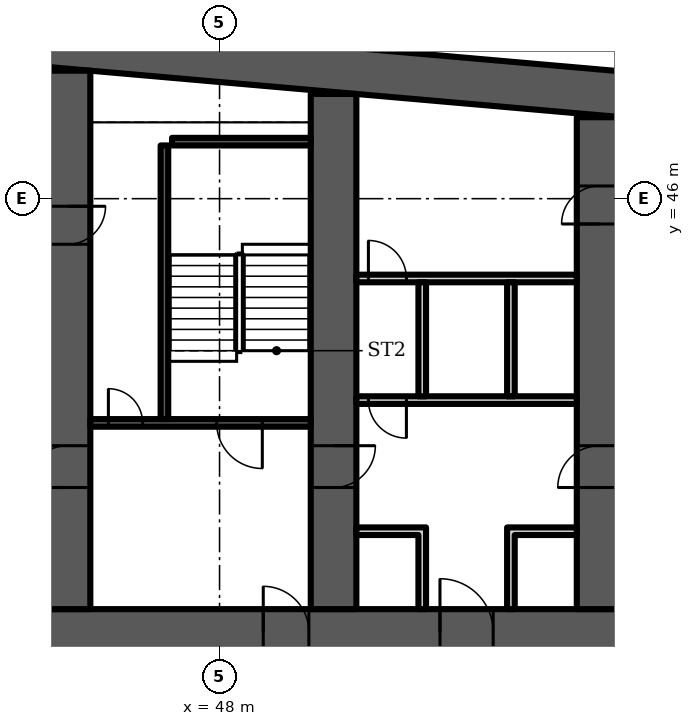
"""IFC4 building model, lengths in metres.
Left out: names, types, materials, properties, quantities, classifications, styles, units other than length and angle.
Written with IfcOpenShell. Run it as: python <this file> out.ifc"""

import sys

from ifc_helpers import new_model, si_unit, direction, frame, frame_2d, origin, place, context, subcontext, project, spatial, polyline, rectangle, outline, extrude, element, fill, save


model = new_model("IFC4")
c1 = context("Model", 3, precision=1e-05, world=origin(), true_north=direction((0.0, 1.0)))
c2 = subcontext(c1, "Body", "Model", "MODEL_VIEW")
j1 = project(units=[si_unit("LENGTHUNIT", "METRE"), si_unit("PLANEANGLEUNIT", "RADIAN")], contexts=[c1])
p1 = place(None, origin())
s1 = spatial("IfcSite", under=j1, at=p1, CompositionType="ELEMENT")
p2 = place(p1, origin())
s2 = spatial("IfcBuilding", under=s1, at=p2, CompositionType="ELEMENT")
p3 = place(p2, frame((0.0, 0.0, 52.3)))
s3 = spatial("IfcBuildingStorey", under=s2, at=p3, CompositionType="ELEMENT", Elevation=52.3)
p4 = place(p3, frame((0.0, 0.0, -0.0)))
e1 = element("IfcWall", 1, at=p4, inside=s3, PredefinedType="SHEAR", context=c2, shape_type="SweptSolid", body=[
    extrude(outline(polyline([(9.0, 47.583), (37.0, 50.032), (65.0, 47.583), (65.0, 48.787), (37.0, 51.237), (9.0, 48.787), (9.0, 47.583)])), origin(), (0.0, 0.0, 1.0), 3.6),
])
p5 = place(p3, frame((9.0, 34.6, 0.0), z_axis=(0.0, 0.0, 1.0), x_axis=(1.0, 0.0, 0.0)))
e2 = element("IfcWall", 2, at=p5, inside=s3, PredefinedType="SHEAR", context=c2, shape_type="SweptSolid", body=[
    extrude(rectangle(XDim=56.0, YDim=1.2, at=frame_2d((28.0, 0.0))), origin(), (0.0, 0.0, 1.0), 3.6),
])
p6 = place(p5, frame((2.0, 0.0, 0.0)))
e3 = element("IfcOpeningElement", 3, at=p6, cuts=e2, PredefinedType="OPENING", context=c2, shape_type="SweptSolid", body=[
    extrude(rectangle(XDim=1.0, YDim=2.1, at=frame_2d((0.5, 1.05))), frame((0.0, 0.61, 0.0), z_axis=(0.0, -1.0, 0.0), x_axis=(1.0, 0.0, 0.0)), (0.0, 0.0, 1.0), 1.22),
])
p7 = place(p5, frame((4.6, 0.0, 0.0)))
e4 = element("IfcOpeningElement", 4, at=p7, cuts=e2, PredefinedType="OPENING", context=c2, shape_type="SweptSolid", body=[
    extrude(rectangle(XDim=1.0, YDim=2.1, at=frame_2d((0.5, 1.05))), frame((0.0, 0.61, 0.0), z_axis=(0.0, -1.0, 0.0), x_axis=(1.0, 0.0, 0.0)), (0.0, 0.0, 1.0), 1.22),
])
p8 = place(p5, frame((7.867, 0.0, 0.0)))
e5 = element("IfcOpeningElement", 5, at=p8, cuts=e2, PredefinedType="OPENING", context=c2, shape_type="SweptSolid", body=[
    extrude(rectangle(XDim=1.1, YDim=2.1, at=frame_2d((0.55, 1.05))), frame((0.0, 0.61, 0.0), z_axis=(0.0, -1.0, 0.0), x_axis=(1.0, 0.0, 0.0)), (0.0, 0.0, 1.0), 1.22),
])
p9 = place(p5, frame((12.033, 0.0, 0.0)))
e6 = element("IfcOpeningElement", 6, at=p9, cuts=e2, PredefinedType="OPENING", context=c2, shape_type="SweptSolid", body=[
    extrude(rectangle(XDim=1.1, YDim=2.1, at=frame_2d((0.55, 1.05))), frame((0.0, 0.61, 0.0), z_axis=(0.0, -1.0, 0.0), x_axis=(1.0, 0.0, 0.0)), (0.0, 0.0, 1.0), 1.22),
])
p10 = place(p5, frame((9.8, 0.0, 0.0)))
e7 = element("IfcOpeningElement", 7, at=p10, cuts=e2, PredefinedType="OPENING", context=c2, shape_type="SweptSolid", body=[
    extrude(rectangle(XDim=1.4, YDim=2.1, at=frame_2d((0.7, 1.05))), frame((0.0, 0.61, 0.0), z_axis=(0.0, -1.0, 0.0), x_axis=(1.0, 0.0, 0.0)), (0.0, 0.0, 1.0), 1.22),
])
p11 = place(p5, frame((14.65, 0.0, 0.0)))
e8 = element("IfcOpeningElement", 8, at=p11, cuts=e2, PredefinedType="OPENING", context=c2, shape_type="SweptSolid", body=[
    extrude(rectangle(XDim=1.2, YDim=2.1, at=frame_2d((0.6, 1.05))), frame((0.0, 0.61, 0.0), z_axis=(0.0, -1.0, 0.0), x_axis=(1.0, 0.0, 0.0)), (0.0, 0.0, 1.0), 1.22),
])
p12 = place(p5, frame((21.867, 0.0, 0.0)))
e9 = element("IfcOpeningElement", 9, at=p12, cuts=e2, PredefinedType="OPENING", context=c2, shape_type="SweptSolid", body=[
    extrude(rectangle(XDim=1.1, YDim=2.1, at=frame_2d((0.55, 1.05))), frame((0.0, 0.61, 0.0), z_axis=(0.0, -1.0, 0.0), x_axis=(1.0, 0.0, 0.0)), (0.0, 0.0, 1.0), 1.22),
])
p13 = place(p5, frame((26.033, 0.0, 0.0)))
e10 = element("IfcOpeningElement", 10, at=p13, cuts=e2, PredefinedType="OPENING", context=c2, shape_type="SweptSolid", body=[
    extrude(rectangle(XDim=1.1, YDim=2.1, at=frame_2d((0.55, 1.05))), frame((0.0, 0.61, 0.0), z_axis=(0.0, -1.0, 0.0), x_axis=(1.0, 0.0, 0.0)), (0.0, 0.0, 1.0), 1.22),
])
p14 = place(p5, frame((23.8, 0.0, 0.0)))
e11 = element("IfcOpeningElement", 11, at=p14, cuts=e2, PredefinedType="OPENING", context=c2, shape_type="SweptSolid", body=[
    extrude(rectangle(XDim=1.4, YDim=2.1, at=frame_2d((0.7, 1.05))), frame((0.0, 0.61, 0.0), z_axis=(0.0, -1.0, 0.0), x_axis=(1.0, 0.0, 0.0)), (0.0, 0.0, 1.0), 1.22),
])
p15 = place(p5, frame((28.867, 0.0, 0.0)))
e12 = element("IfcOpeningElement", 12, at=p15, cuts=e2, PredefinedType="OPENING", context=c2, shape_type="SweptSolid", body=[
    extrude(rectangle(XDim=1.1, YDim=2.1, at=frame_2d((0.55, 1.05))), frame((0.0, 0.61, 0.0), z_axis=(0.0, -1.0, 0.0), x_axis=(1.0, 0.0, 0.0)), (0.0, 0.0, 1.0), 1.22),
])
p16 = place(p5, frame((33.033, 0.0, 0.0)))
e13 = element("IfcOpeningElement", 13, at=p16, cuts=e2, PredefinedType="OPENING", context=c2, shape_type="SweptSolid", body=[
    extrude(rectangle(XDim=1.1, YDim=2.1, at=frame_2d((0.55, 1.05))), frame((0.0, 0.61, 0.0), z_axis=(0.0, -1.0, 0.0), x_axis=(1.0, 0.0, 0.0)), (0.0, 0.0, 1.0), 1.22),
])
p17 = place(p5, frame((40.15, 0.0, 0.0)))
e14 = element("IfcOpeningElement", 14, at=p17, cuts=e2, PredefinedType="OPENING", context=c2, shape_type="SweptSolid", body=[
    extrude(rectangle(XDim=1.2, YDim=2.1, at=frame_2d((0.6, 1.05))), frame((0.0, 0.61, 0.0), z_axis=(0.0, -1.0, 0.0), x_axis=(1.0, 0.0, 0.0)), (0.0, 0.0, 1.0), 1.22),
])
p18 = place(p5, frame((44.8, 0.0, 0.0)))
e15 = element("IfcOpeningElement", 15, at=p18, cuts=e2, PredefinedType="OPENING", context=c2, shape_type="SweptSolid", body=[
    extrude(rectangle(XDim=1.4, YDim=2.1, at=frame_2d((0.7, 1.05))), frame((0.0, 0.61, 0.0), z_axis=(0.0, -1.0, 0.0), x_axis=(1.0, 0.0, 0.0)), (0.0, 0.0, 1.0), 1.22),
])
p19 = place(p5, frame((49.867, 0.0, 0.0)))
e16 = element("IfcOpeningElement", 16, at=p19, cuts=e2, PredefinedType="OPENING", context=c2, shape_type="SweptSolid", body=[
    extrude(rectangle(XDim=1.1, YDim=2.1, at=frame_2d((0.55, 1.05))), frame((0.0, 0.61, 0.0), z_axis=(0.0, -1.0, 0.0), x_axis=(1.0, 0.0, 0.0)), (0.0, 0.0, 1.0), 1.22),
])
p20 = place(p5, frame((53.5, 0.0, 0.0)))
e17 = element("IfcOpeningElement", 17, at=p20, cuts=e2, PredefinedType="OPENING", context=c2, shape_type="SweptSolid", body=[
    extrude(rectangle(XDim=1.1, YDim=2.1, at=frame_2d((0.55, 1.05))), frame((0.0, 0.61, 0.0), z_axis=(0.0, -1.0, 0.0), x_axis=(1.0, 0.0, 0.0)), (0.0, 0.0, 1.0), 1.22),
])
p21 = place(p5, frame((51.567, 0.0, 0.0)))
e18 = element("IfcOpeningElement", 18, at=p21, cuts=e2, PredefinedType="OPENING", context=c2, shape_type="SweptSolid", body=[
    extrude(rectangle(XDim=1.4, YDim=2.1, at=frame_2d((0.7, 1.05))), frame((0.0, 0.61, 0.0), z_axis=(0.0, -1.0, 0.0), x_axis=(1.0, 0.0, 0.0)), (0.0, 0.0, 1.0), 1.22),
])
p22 = place(p3, frame((44.0, 35.2, 0.0), z_axis=(0.0, 0.0, 1.0), x_axis=(0.0, 1.0, 0.0)))
e19 = element("IfcWall", 19, at=p22, inside=s3, PredefinedType="SHEAR", context=c2, shape_type="SweptSolid", body=[
    extrude(rectangle(XDim=14.168, YDim=1.2, at=frame_2d((7.084, 0.0))), origin(), (0.0, 0.0, 1.0), 3.6),
])
p23 = place(p22, frame((3.2, 0.0, 0.0)))
e20 = element("IfcOpeningElement", 20, at=p23, cuts=e19, PredefinedType="OPENING", context=c2, shape_type="SweptSolid", body=[
    extrude(rectangle(XDim=1.1, YDim=2.1, at=frame_2d((0.55, 1.05))), frame((0.0, 0.61, 0.0), z_axis=(0.0, -1.0, 0.0), x_axis=(1.0, 0.0, 0.0)), (0.0, 0.0, 1.0), 1.22),
])
p24 = place(p22, frame((9.6, 0.0, 0.0)))
e21 = element("IfcOpeningElement", 21, at=p24, cuts=e19, PredefinedType="OPENING", context=c2, shape_type="SweptSolid", body=[
    extrude(rectangle(XDim=1.0, YDim=2.1, at=frame_2d((0.5, 1.05))), frame((0.0, 0.61, 0.0), z_axis=(0.0, -1.0, 0.0), x_axis=(1.0, 0.0, 0.0)), (0.0, 0.0, 1.0), 1.22),
])
p25 = place(p3, frame((51.0, 35.2, 0.0), z_axis=(0.0, 0.0, 1.0), x_axis=(0.0, 1.0, 0.0)))
e22 = element("IfcWall", 22, at=p25, inside=s3, PredefinedType="SHEAR", context=c2, shape_type="SweptSolid", body=[
    extrude(rectangle(XDim=13.555, YDim=1.2, at=frame_2d((6.778, 0.0))), origin(), (0.0, 0.0, 1.0), 3.6),
])
p26 = place(p25, frame((3.2, 0.0, 0.0)))
e23 = element("IfcOpeningElement", 23, at=p26, cuts=e22, PredefinedType="OPENING", context=c2, shape_type="SweptSolid", body=[
    extrude(rectangle(XDim=1.1, YDim=2.1, at=frame_2d((0.55, 1.05))), frame((0.0, 0.61, 0.0), z_axis=(0.0, -1.0, 0.0), x_axis=(1.0, 0.0, 0.0)), (0.0, 0.0, 1.0), 1.22),
])
p27 = place(p3, frame((58.0, 35.2, 0.0), z_axis=(0.0, 0.0, 1.0), x_axis=(0.0, 1.0, 0.0)))
e24 = element("IfcWall", 24, at=p27, inside=s3, PredefinedType="SHEAR", context=c2, shape_type="SweptSolid", body=[
    extrude(rectangle(XDim=12.943, YDim=1.2, at=frame_2d((6.471, 0.0))), origin(), (0.0, 0.0, 1.0), 3.6),
])
p28 = place(p27, frame((10.134, 0.0, 0.0)))
e25 = element("IfcOpeningElement", 25, at=p28, cuts=e24, PredefinedType="OPENING", context=c2, shape_type="SweptSolid", body=[
    extrude(rectangle(XDim=1.0, YDim=2.1, at=frame_2d((0.5, 1.05))), frame((0.0, 0.61, 0.0), z_axis=(0.0, -1.0, 0.0), x_axis=(1.0, 0.0, 0.0)), (0.0, 0.0, 1.0), 1.22),
])
p29 = place(p27, frame((3.2, 0.0, 0.0)))
e26 = element("IfcOpeningElement", 26, at=p29, cuts=e24, PredefinedType="OPENING", context=c2, shape_type="SweptSolid", body=[
    extrude(rectangle(XDim=1.1, YDim=2.1, at=frame_2d((0.55, 1.05))), frame((0.0, 0.61, 0.0), z_axis=(0.0, -1.0, 0.0), x_axis=(1.0, 0.0, 0.0)), (0.0, 0.0, 1.0), 1.22),
])
p30 = place(p3, frame((44.6, 40.1, 0.0), z_axis=(0.0, 0.0, 1.0), x_axis=(1.0, 0.0, 0.0)))
e27 = element("IfcWall", 27, at=p30, inside=s3, PredefinedType="SHEAR", context=c2, shape_type="SweptSolid", body=[
    extrude(rectangle(XDim=5.8, YDim=0.2, at=frame_2d((2.9, 0.0))), origin(), (0.0, 0.0, 1.0), 3.2),
])
p31 = place(p30, frame((3.325, 0.0, 0.0)))
e28 = element("IfcOpeningElement", 28, at=p31, cuts=e27, PredefinedType="OPENING", context=c2, shape_type="SweptSolid", body=[
    extrude(rectangle(XDim=1.2, YDim=2.1, at=frame_2d((0.6, 1.05))), frame((0.0, 0.11, 0.0), z_axis=(0.0, -1.0, 0.0), x_axis=(1.0, 0.0, 0.0)), (0.0, 0.0, 1.0), 0.22),
])
p32 = place(p30, frame((0.475, 0.0, 0.0)))
e29 = element("IfcOpeningElement", 29, at=p32, cuts=e27, PredefinedType="OPENING", context=c2, shape_type="SweptSolid", body=[
    extrude(rectangle(XDim=0.9, YDim=2.1, at=frame_2d((0.45, 1.05))), frame((0.0, 0.11, 0.0), z_axis=(0.0, -1.0, 0.0), x_axis=(1.0, 0.0, 0.0)), (0.0, 0.0, 1.0), 0.22),
])
p33 = place(p3, frame((46.55, 40.2, 0.0), z_axis=(0.0, 0.0, 1.0), x_axis=(0.0, 1.0, 0.0)))
e30 = element("IfcWall", 30, at=p33, inside=s3, PredefinedType="SHEAR", context=c2, shape_type="SweptSolid", body=[
    extrude(rectangle(XDim=7.2, YDim=0.2, at=frame_2d((3.6, 0.0))), origin(), (0.0, 0.0, 1.0), 3.2),
])
p34 = place(p3, frame((46.75, 47.5, 0.0), z_axis=(0.0, 0.0, 1.0), x_axis=(1.0, 0.0, 0.0)))
e31 = element("IfcWall", 31, at=p34, inside=s3, PredefinedType="SHEAR", context=c2, shape_type="SweptSolid", body=[
    extrude(rectangle(XDim=3.65, YDim=0.2, at=frame_2d((1.825, 0.0))), origin(), (0.0, 0.0, 1.0), 3.2),
])
p35 = place(p3, frame((51.6, 40.7, 0.0), z_axis=(0.0, 0.0, 1.0), x_axis=(1.0, 0.0, 0.0)))
e32 = element("IfcWall", 32, at=p35, inside=s3, PredefinedType="PARTITIONING", context=c2, shape_type="SweptSolid", body=[
    extrude(rectangle(XDim=5.8, YDim=0.2, at=frame_2d((2.9, 0.0))), origin(), (0.0, 0.0, 1.0), 3.2),
])
p36 = place(p35, frame((0.317, 0.0, 0.0)))
e33 = element("IfcOpeningElement", 33, at=p36, cuts=e32, PredefinedType="OPENING", context=c2, shape_type="SweptSolid", body=[
    extrude(rectangle(XDim=1.0, YDim=2.1, at=frame_2d((0.5, 1.05))), frame((0.0, 0.11, 0.0), z_axis=(0.0, -1.0, 0.0), x_axis=(1.0, 0.0, 0.0)), (0.0, 0.0, 1.0), 0.22),
])
p37 = place(p3, frame((51.6, 43.9, 0.0), z_axis=(0.0, 0.0, 1.0), x_axis=(1.0, 0.0, 0.0)))
e34 = element("IfcWall", 34, at=p37, inside=s3, PredefinedType="PARTITIONING", context=c2, shape_type="SweptSolid", body=[
    extrude(rectangle(XDim=5.8, YDim=0.2, at=frame_2d((2.9, 0.0))), origin(), (0.0, 0.0, 1.0), 3.2),
])
p38 = place(p37, frame((0.317, 0.0, 0.0)))
e35 = element("IfcOpeningElement", 35, at=p38, cuts=e34, PredefinedType="OPENING", context=c2, shape_type="SweptSolid", body=[
    extrude(rectangle(XDim=1.0, YDim=2.1, at=frame_2d((0.5, 1.05))), frame((0.0, 0.11, 0.0), z_axis=(0.0, -1.0, 0.0), x_axis=(1.0, 0.0, 0.0)), (0.0, 0.0, 1.0), 0.22),
])
p39 = place(p3, frame((0.0, 0.0, -0.0)))
e36 = element("IfcWall", 36, at=p39, inside=s3, PredefinedType="PARTITIONING", context=c2, shape_type="SweptSolid", body=[
    extrude(outline(polyline([(53.233, 37.15), (51.6, 37.15), (51.6, 37.35), (53.233, 37.35), (53.433, 37.35), (53.433, 35.2), (53.233, 35.2), (53.233, 37.15)])), origin(), (0.0, 0.0, 1.0), 3.2),
])
p40 = place(p3, frame((0.0, 0.0, -0.0)))
e37 = element("IfcWall", 37, at=p40, inside=s3, PredefinedType="PARTITIONING", context=c2, shape_type="SweptSolid", body=[
    extrude(outline(polyline([(55.567, 37.35), (55.767, 37.35), (57.4, 37.35), (57.4, 37.15), (55.767, 37.15), (55.767, 35.2), (55.567, 35.2), (55.567, 37.35)])), origin(), (0.0, 0.0, 1.0), 3.2),
])
p41 = place(p3, frame((0.0, 0.0, -0.0)))
e38 = element("IfcWall", 38, at=p41, inside=s3, PredefinedType="PARTITIONING", context=c2, shape_type="SweptSolid", body=[
    extrude(outline(polyline([(53.233, 40.8), (53.233, 43.8), (53.433, 43.8), (53.433, 40.8), (53.233, 40.8)])), origin(), (0.0, 0.0, 1.0), 3.2),
])
p42 = place(p3, frame((0.0, 0.0, -0.0)))
e39 = element("IfcWall", 39, at=p42, inside=s3, PredefinedType="PARTITIONING", context=c2, shape_type="SweptSolid", body=[
    extrude(outline(polyline([(55.567, 40.8), (55.567, 43.8), (55.767, 43.8), (55.767, 40.8), (55.567, 40.8)])), origin(), (0.0, 0.0, 1.0), 3.2),
])
p43 = place(p31, origin())
e40 = element("IfcDoor", 40, at=p43, inside=s3, OperationType="SINGLE_SWING_RIGHT", PredefinedType="DOOR", context=c2, shape_type="SweptSolid", body=[
    extrude(rectangle(XDim=1.2, YDim=2.1, at=frame_2d((0.6, 1.05))), frame((0.0, 0.025, 0.0), z_axis=(0.0, -1.0, 0.0), x_axis=(1.0, 0.0, 0.0)), (0.0, 0.0, 1.0), 0.05),
])
fill(e28, e40)
p44 = place(p32, origin())
e41 = element("IfcDoor", 41, at=p44, inside=s3, OperationType="SINGLE_SWING_LEFT", PredefinedType="DOOR", context=c2, shape_type="SweptSolid", body=[
    extrude(rectangle(XDim=0.9, YDim=2.1, at=frame_2d((0.45, 1.05))), frame((0.0, 0.025, 0.0), z_axis=(0.0, -1.0, 0.0), x_axis=(1.0, 0.0, 0.0)), (0.0, 0.0, 1.0), 0.05),
])
fill(e29, e41)
p45 = place(p17, origin())
e42 = element("IfcDoor", 42, at=p45, inside=s3, OperationType="SINGLE_SWING_LEFT", PredefinedType="DOOR", context=c2, shape_type="SweptSolid", body=[
    extrude(rectangle(XDim=1.2, YDim=2.1, at=frame_2d((0.6, 1.05))), frame((0.0, 0.025, 0.0), z_axis=(0.0, -1.0, 0.0), x_axis=(1.0, 0.0, 0.0)), (0.0, 0.0, 1.0), 0.05),
])
fill(e14, e42)
p46 = place(p18, origin())
e43 = element("IfcDoor", 43, at=p46, inside=s3, OperationType="DOUBLE_DOOR_SINGLE_SWING", PredefinedType="DOOR", context=c2, shape_type="SweptSolid", body=[
    extrude(rectangle(XDim=1.4, YDim=2.1, at=frame_2d((0.7, 1.05))), frame((0.0, 0.025, 0.0), z_axis=(0.0, -1.0, 0.0), x_axis=(1.0, 0.0, 0.0)), (0.0, 0.0, 1.0), 0.05),
])
fill(e15, e43)
p47 = place(p36, origin())
e44 = element("IfcDoor", 44, at=p47, inside=s3, OperationType="SINGLE_SWING_RIGHT", PredefinedType="DOOR", context=c2, shape_type="SweptSolid", body=[
    extrude(rectangle(XDim=1.0, YDim=2.1, at=frame_2d((0.5, 1.05))), frame((0.0, 0.025, 0.0), z_axis=(0.0, -1.0, 0.0), x_axis=(1.0, 0.0, 0.0)), (0.0, 0.0, 1.0), 0.05),
])
fill(e33, e44)
p48 = place(p38, origin())
e45 = element("IfcDoor", 45, at=p48, inside=s3, OperationType="SINGLE_SWING_LEFT", PredefinedType="DOOR", context=c2, shape_type="SweptSolid", body=[
    extrude(rectangle(XDim=1.0, YDim=2.1, at=frame_2d((0.5, 1.05))), frame((0.0, 0.025, 0.0), z_axis=(0.0, -1.0, 0.0), x_axis=(1.0, 0.0, 0.0)), (0.0, 0.0, 1.0), 0.05),
])
fill(e35, e45)
p49 = place(p28, origin())
e46 = element("IfcDoor", 46, at=p49, inside=s3, OperationType="SINGLE_SWING_LEFT", PredefinedType="DOOR", context=c2, shape_type="SweptSolid", body=[
    extrude(rectangle(XDim=1.0, YDim=2.1, at=frame_2d((0.5, 1.05))), frame((0.0, 0.6, 0.0), z_axis=(0.0, -1.0, 0.0), x_axis=(1.0, 0.0, 0.0)), (0.0, 0.0, 1.0), 1.199),
])
fill(e25, e46)
p50 = place(p23, origin())
e47 = element("IfcDoor", 47, at=p50, inside=s3, OperationType="SINGLE_SWING_LEFT", PredefinedType="DOOR", context=c2, shape_type="SweptSolid", body=[
    extrude(rectangle(XDim=1.1, YDim=2.1, at=frame_2d((0.55, 1.05))), frame((0.0, 0.025, 0.0), z_axis=(0.0, -1.0, 0.0), x_axis=(1.0, 0.0, 0.0)), (0.0, 0.0, 1.0), 0.05),
])
fill(e20, e47)
p51 = place(p24, origin())
e48 = element("IfcDoor", 48, at=p51, inside=s3, OperationType="SINGLE_SWING_RIGHT", PredefinedType="DOOR", context=c2, shape_type="SweptSolid", body=[
    extrude(rectangle(XDim=1.0, YDim=2.1, at=frame_2d((0.5, 1.05))), frame((0.0, 0.6, 0.0), z_axis=(0.0, -1.0, 0.0), x_axis=(1.0, 0.0, 0.0)), (0.0, 0.0, 1.0), 1.199),
])
fill(e21, e48)
p52 = place(p26, origin())
e49 = element("IfcDoor", 49, at=p52, inside=s3, OperationType="SINGLE_SWING_RIGHT", PredefinedType="DOOR", context=c2, shape_type="SweptSolid", body=[
    extrude(rectangle(XDim=1.1, YDim=2.1, at=frame_2d((0.55, 1.05))), frame((0.0, 0.025, 0.0), z_axis=(0.0, -1.0, 0.0), x_axis=(1.0, 0.0, 0.0)), (0.0, 0.0, 1.0), 0.05),
])
fill(e23, e49)
p53 = place(p29, origin())
e50 = element("IfcDoor", 50, at=p53, inside=s3, OperationType="SINGLE_SWING_LEFT", PredefinedType="DOOR", context=c2, shape_type="SweptSolid", body=[
    extrude(rectangle(XDim=1.1, YDim=2.1, at=frame_2d((0.55, 1.05))), frame((0.0, 0.025, 0.0), z_axis=(0.0, -1.0, 0.0), x_axis=(1.0, 0.0, 0.0)), (0.0, 0.0, 1.0), 0.05),
])
fill(e26, e50)
save(model, sys.argv[1])
